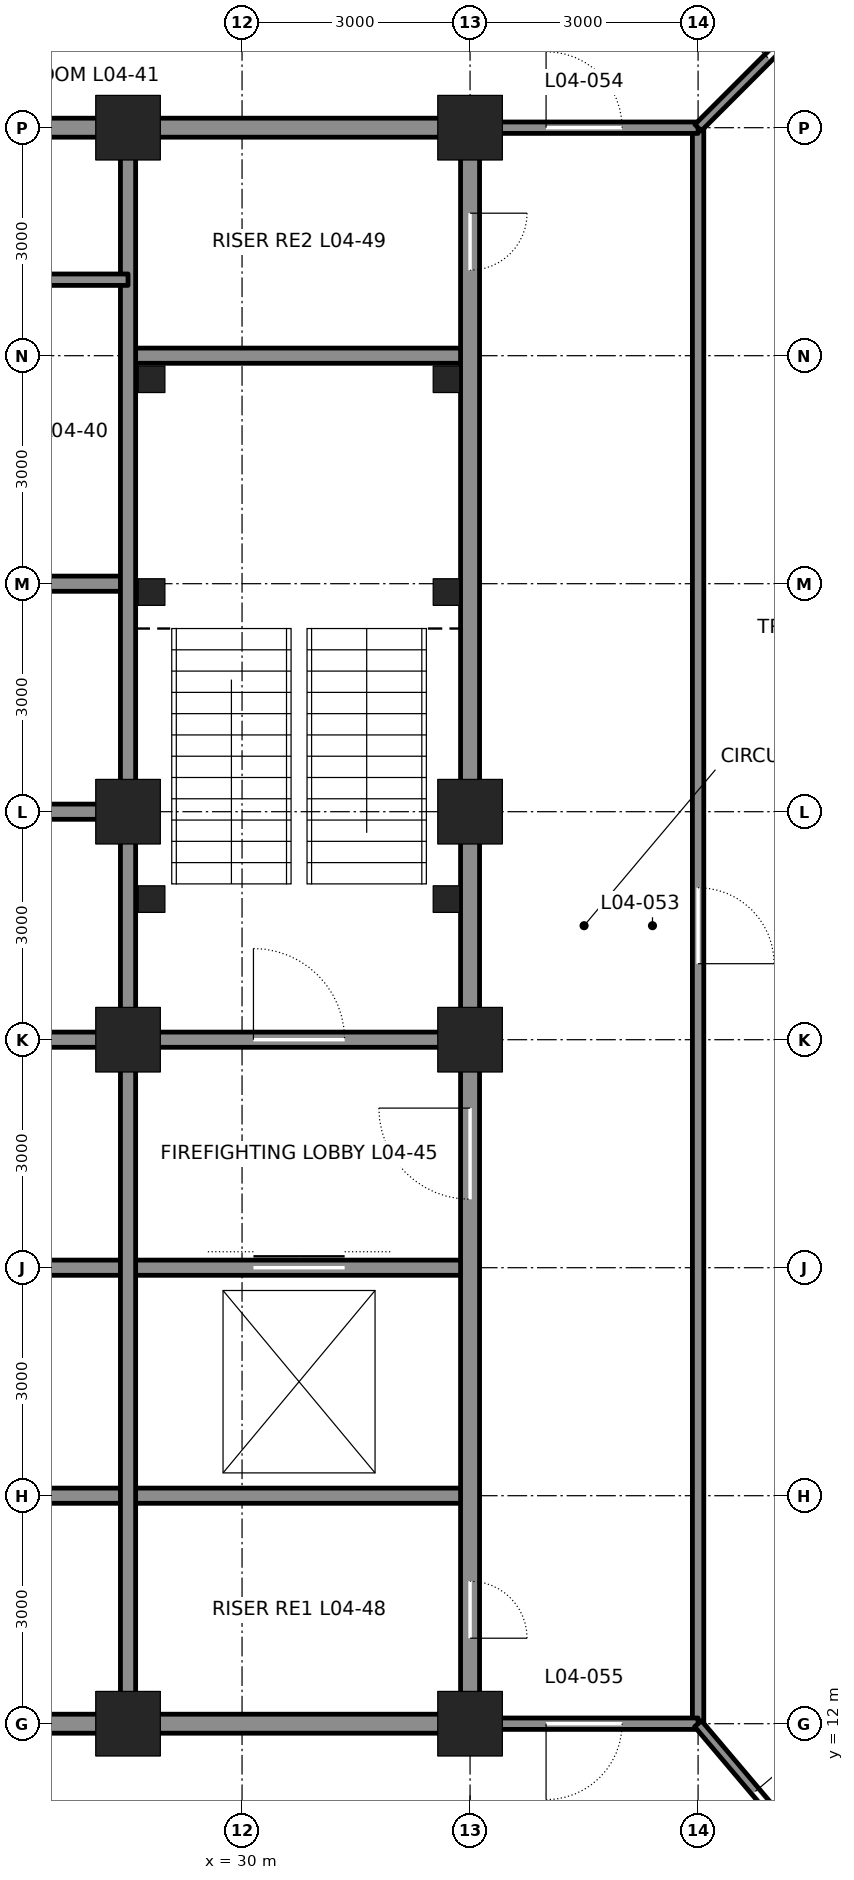
"""IFC4 building model, lengths in metres.
Left out: names, types, materials, properties, quantities, classifications, styles, units other than length and angle.
Written with IfcOpenShell. Run it as: python <this file> out.ifc"""

import sys

from ifc_helpers import new_model, si_unit, direction, frame, frame_2d, origin, origin_2d, place, context, subcontext, project, spatial, rectangle, hollow_rectangle, extrude, element, fill, save


model = new_model("IFC4")
c1 = context("Model", 3, precision=1e-05, world=origin(), true_north=direction((0.0, 1.0)))
c2 = subcontext(c1, "Body", "Model", "MODEL_VIEW")
j1 = project(units=[si_unit("LENGTHUNIT", "METRE"), si_unit("PLANEANGLEUNIT", "RADIAN")], contexts=[c1])
p1 = place(None, origin())
s1 = spatial("IfcSite", under=j1, at=p1, CompositionType="ELEMENT")
p2 = place(p1, origin())
s2 = spatial("IfcBuilding", under=s1, at=p2, CompositionType="ELEMENT")
p3 = place(p2, frame((0.0, 0.0, 24.3)))
s3 = spatial("IfcBuildingStorey", under=s2, at=p3, CompositionType="ELEMENT", Elevation=24.3)
for number, where, z_axis, x_axis in (
    (1, (28.5, 12.0, 0.0), (0.0, 0.0, 1.0), (1.0, 0.0, 0.0)),
    (2, (33.0, 12.0, 0.0), (0.0, 0.0, 1.0), (1.0, 0.0, 0.0)),
    (3, (28.5, 33.0, 0.0), (0.0, 0.0, 1.0), (1.0, 0.0, 0.0)),
    (4, (33.0, 33.0, 0.0), (0.0, 0.0, 1.0), (1.0, 0.0, 0.0)),
    (5, (33.0, 21.0, 0.0), (0.0, 0.0, 1.0), (1.0, 0.0, 0.0)),
    (6, (33.0, 24.0, 0.0), (0.0, 0.0, 1.0), (1.0, 0.0, 0.0)),
    (7, (28.5, 21.0, 0.0), (0.0, 0.0, 1.0), (1.0, 0.0, 0.0)),
    (8, (28.5, 24.0, 0.0), (0.0, 0.0, 1.0), (1.0, 0.0, 0.0)),
):
    element("IfcColumn", number, at=place(p3, frame(where, z_axis=z_axis, x_axis=x_axis)), inside=s3, PredefinedType="COLUMN", context=c2, shape_type="SweptSolid", body=[
        extrude(hollow_rectangle(XDim=0.85, YDim=0.85, WallThickness=0.085, at=origin_2d()), origin(), (0.0, 0.0, 1.0), 4.5),
    ])
p4 = place(p3, frame((25.75, 12.0, 0.0), z_axis=(0.0, 0.0, 1.0), x_axis=(1.0, 0.0, 0.0)))
e9 = element("IfcWall", 9, at=p4, inside=s3, PredefinedType="SOLIDWALL", context=c2, shape_type="SweptSolid", body=[
    extrude(rectangle(XDim=2.5, YDim=0.25, at=frame_2d((1.25, 0.0))), origin(), (0.0, 0.0, 1.0), 3.181),
])
p5 = place(p3, frame((28.75, 12.0, 0.0), z_axis=(0.0, 0.0, 1.0), x_axis=(1.0, 0.0, 0.0)))
e10 = element("IfcWall", 10, at=p5, inside=s3, PredefinedType="SOLIDWALL", context=c2, shape_type="SweptSolid", body=[
    extrude(rectangle(XDim=4.0, YDim=0.25, at=frame_2d((2.0, 0.0))), origin(), (0.0, 0.0, 1.0), 3.181),
])
p6 = place(p3, frame((25.5, 15.0, 0.0), z_axis=(0.0, 0.0, 1.0), x_axis=(1.0, 0.0, 0.0)))
e11 = element("IfcWall", 11, at=p6, inside=s3, PredefinedType="SOLIDWALL", context=c2, shape_type="SweptSolid", body=[
    extrude(rectangle(XDim=7.5, YDim=0.2, at=frame_2d((3.75, 0.0))), origin(), (0.0, 0.0, 1.0), 4.34),
])
p7 = place(p3, frame((25.5, 24.0, 0.0), z_axis=(0.0, 0.0, 1.0), x_axis=(1.0, 0.0, 0.0)))
e12 = element("IfcWall", 12, at=p7, inside=s3, PredefinedType="SOLIDWALL", context=c2, shape_type="SweptSolid", body=[
    extrude(rectangle(XDim=2.75, YDim=0.2, at=frame_2d((1.375, 0.0))), origin(), (0.0, 0.0, 1.0), 3.39),
])
p8 = place(p3, frame((25.5, 27.0, 0.0), z_axis=(0.0, 0.0, 1.0), x_axis=(1.0, 0.0, 0.0)))
e13 = element("IfcWall", 13, at=p8, inside=s3, PredefinedType="SOLIDWALL", context=c2, shape_type="SweptSolid", body=[
    extrude(rectangle(XDim=3.0, YDim=0.2, at=frame_2d((1.5, 0.0))), origin(), (0.0, 0.0, 1.0), 4.34),
])
p9 = place(p3, frame((28.5, 30.0, 0.0), z_axis=(0.0, 0.0, 1.0), x_axis=(1.0, 0.0, 0.0)))
e14 = element("IfcWall", 14, at=p9, inside=s3, PredefinedType="SOLIDWALL", context=c2, shape_type="SweptSolid", body=[
    extrude(rectangle(XDim=4.5, YDim=0.2, at=frame_2d((2.25, 0.0))), origin(), (0.0, 0.0, 1.0), 4.34),
])
p10 = place(p3, frame((25.75, 33.0, 0.0), z_axis=(0.0, 0.0, 1.0), x_axis=(1.0, 0.0, 0.0)))
e15 = element("IfcWall", 15, at=p10, inside=s3, PredefinedType="SOLIDWALL", context=c2, shape_type="SweptSolid", body=[
    extrude(rectangle(XDim=2.5, YDim=0.25, at=frame_2d((1.25, 0.0))), origin(), (0.0, 0.0, 1.0), 3.181),
])
p11 = place(p3, frame((28.75, 33.0, 0.0), z_axis=(0.0, 0.0, 1.0), x_axis=(1.0, 0.0, 0.0)))
e16 = element("IfcWall", 16, at=p11, inside=s3, PredefinedType="SOLIDWALL", context=c2, shape_type="SweptSolid", body=[
    extrude(rectangle(XDim=4.0, YDim=0.25, at=frame_2d((2.0, 0.0))), origin(), (0.0, 0.0, 1.0), 3.181),
])
p12 = place(p3, frame((25.5, 18.0, 0.0), z_axis=(0.0, 0.0, 1.0), x_axis=(1.0, 0.0, 0.0)))
e17 = element("IfcWall", 17, at=p12, inside=s3, PredefinedType="SOLIDWALL", context=c2, shape_type="SweptSolid", body=[
    extrude(rectangle(XDim=7.5, YDim=0.2, at=frame_2d((3.75, 0.0))), origin(), (0.0, 0.0, 1.0), 4.34),
])
p13 = place(p12, frame((4.65, 0.0, 0.0)))
e18 = element("IfcOpeningElement", 18, at=p13, cuts=e17, PredefinedType="OPENING", context=c2, shape_type="SweptSolid", body=[
    extrude(rectangle(XDim=1.2, YDim=2.1, at=frame_2d((0.6, 1.05))), frame((0.0, 0.11, 0.0), z_axis=(0.0, -1.0, 0.0), x_axis=(1.0, 0.0, 0.0)), (0.0, 0.0, 1.0), 0.22),
])
p14 = place(p3, frame((25.5, 21.0, 0.0), z_axis=(0.0, 0.0, 1.0), x_axis=(1.0, 0.0, 0.0)))
e19 = element("IfcWall", 19, at=p14, inside=s3, PredefinedType="SOLIDWALL", context=c2, shape_type="SweptSolid", body=[
    extrude(rectangle(XDim=2.75, YDim=0.2, at=frame_2d((1.375, 0.0))), origin(), (0.0, 0.0, 1.0), 3.39),
])
p15 = place(p3, frame((28.75, 21.0, 0.0), z_axis=(0.0, 0.0, 1.0), x_axis=(1.0, 0.0, 0.0)))
e20 = element("IfcWall", 20, at=p15, inside=s3, PredefinedType="SOLIDWALL", context=c2, shape_type="SweptSolid", body=[
    extrude(rectangle(XDim=4.0, YDim=0.2, at=frame_2d((2.0, 0.0))), origin(), (0.0, 0.0, 1.0), 3.39),
])
p16 = place(p15, frame((1.4, 0.0, 0.0)))
e21 = element("IfcOpeningElement", 21, at=p16, cuts=e20, PredefinedType="OPENING", context=c2, shape_type="SweptSolid", body=[
    extrude(rectangle(XDim=1.2, YDim=2.1, at=frame_2d((0.6, 1.05))), frame((0.0, 0.11, 0.0), z_axis=(0.0, -1.0, 0.0), x_axis=(1.0, 0.0, 0.0)), (0.0, 0.0, 1.0), 0.22),
])
p17 = place(p3, frame((28.5, 12.25, 0.0), z_axis=(0.0, 0.0, 1.0), x_axis=(0.0, 1.0, 0.0)))
e22 = element("IfcWall", 22, at=p17, inside=s3, PredefinedType="SOLIDWALL", context=c2, shape_type="SweptSolid", body=[
    extrude(rectangle(XDim=8.5, YDim=0.2, at=frame_2d((4.25, 0.0))), origin(), (0.0, 0.0, 1.0), 3.413),
])
p18 = place(p3, frame((28.5, 21.25, 0.0), z_axis=(0.0, 0.0, 1.0), x_axis=(0.0, 1.0, 0.0)))
e23 = element("IfcWall", 23, at=p18, inside=s3, PredefinedType="SOLIDWALL", context=c2, shape_type="SweptSolid", body=[
    extrude(rectangle(XDim=2.5, YDim=0.2, at=frame_2d((1.25, 0.0))), origin(), (0.0, 0.0, 1.0), 3.413),
])
p19 = place(p3, frame((28.5, 24.25, 0.0), z_axis=(0.0, 0.0, 1.0), x_axis=(0.0, 1.0, 0.0)))
e24 = element("IfcWall", 24, at=p19, inside=s3, PredefinedType="SOLIDWALL", context=c2, shape_type="SweptSolid", body=[
    extrude(rectangle(XDim=8.5, YDim=0.2, at=frame_2d((4.25, 0.0))), origin(), (0.0, 0.0, 1.0), 3.413),
])
p20 = place(p3, frame((33.0, 12.25, 0.0), z_axis=(0.0, 0.0, 1.0), x_axis=(0.0, 1.0, 0.0)))
e25 = element("IfcWall", 25, at=p20, inside=s3, PredefinedType="SOLIDWALL", context=c2, shape_type="SweptSolid", body=[
    extrude(rectangle(XDim=8.5, YDim=0.25, at=frame_2d((4.25, 0.0))), origin(), (0.0, 0.0, 1.0), 3.113),
])
p21 = place(p20, frame((6.65, 0.0, 0.0)))
e26 = element("IfcOpeningElement", 26, at=p21, cuts=e25, PredefinedType="OPENING", context=c2, shape_type="SweptSolid", body=[
    extrude(rectangle(XDim=1.2, YDim=2.1, at=frame_2d((0.6, 1.05))), frame((0.0, 0.135, 0.0), z_axis=(0.0, -1.0, 0.0), x_axis=(1.0, 0.0, 0.0)), (0.0, 0.0, 1.0), 0.27),
])
p22 = place(p20, frame((0.875, 0.0, 0.0)))
e27 = element("IfcOpeningElement", 27, at=p22, cuts=e25, PredefinedType="OPENING", context=c2, shape_type="SweptSolid", body=[
    extrude(rectangle(XDim=0.75, YDim=2.1, at=frame_2d((0.375, 1.05))), frame((0.0, 0.135, 0.0), z_axis=(0.0, -1.0, 0.0), x_axis=(1.0, 0.0, 0.0)), (0.0, 0.0, 1.0), 0.27),
])
p23 = place(p3, frame((33.0, 21.25, 0.0), z_axis=(0.0, 0.0, 1.0), x_axis=(0.0, 1.0, 0.0)))
e28 = element("IfcWall", 28, at=p23, inside=s3, PredefinedType="SOLIDWALL", context=c2, shape_type="SweptSolid", body=[
    extrude(rectangle(XDim=2.5, YDim=0.25, at=frame_2d((1.25, 0.0))), origin(), (0.0, 0.0, 1.0), 3.113),
])
p24 = place(p3, frame((33.0, 24.25, 0.0), z_axis=(0.0, 0.0, 1.0), x_axis=(0.0, 1.0, 0.0)))
e29 = element("IfcWall", 29, at=p24, inside=s3, PredefinedType="SOLIDWALL", context=c2, shape_type="SweptSolid", body=[
    extrude(rectangle(XDim=8.5, YDim=0.25, at=frame_2d((4.25, 0.0))), origin(), (0.0, 0.0, 1.0), 3.113),
])
p25 = place(p24, frame((6.875, 0.0, 0.0)))
e30 = element("IfcOpeningElement", 30, at=p25, cuts=e29, PredefinedType="OPENING", context=c2, shape_type="SweptSolid", body=[
    extrude(rectangle(XDim=0.75, YDim=2.1, at=frame_2d((0.375, 1.05))), frame((0.0, 0.135, 0.0), z_axis=(0.0, -1.0, 0.0), x_axis=(1.0, 0.0, 0.0)), (0.0, 0.0, 1.0), 0.27),
])
p26 = place(p3, frame((25.5, 31.0, 0.0), z_axis=(0.0, 0.0, 1.0), x_axis=(1.0, 0.0, 0.0)))
e31 = element("IfcWall", 31, at=p26, inside=s3, PredefinedType="PARTITIONING", context=c2, shape_type="SweptSolid", body=[
    extrude(rectangle(XDim=3.0, YDim=0.15, at=frame_2d((1.5, 0.0))), origin(), (0.0, 0.0, 1.0), 4.34),
])
p27 = place(p3, frame((36.0, 12.0, -0.3), z_axis=(0.0, 0.0, 1.0), x_axis=(0.0, 1.0, 0.0)))
e32 = element("IfcWall", 32, at=p27, inside=s3, PredefinedType="PARTITIONING", context=c2, shape_type="SweptSolid", body=[
    extrude(rectangle(XDim=21.0, YDim=0.15, at=frame_2d((10.5, 0.0))), origin(), (0.0, 0.0, 1.0), 4.34),
])
p28 = place(p27, frame((10.0, 0.0, 0.3)))
e33 = element("IfcOpeningElement", 33, at=p28, cuts=e32, PredefinedType="OPENING", context=c2, shape_type="SweptSolid", body=[
    extrude(rectangle(XDim=1.0, YDim=2.4, at=frame_2d((0.5, 1.2))), frame((0.0, 0.085, 0.0), z_axis=(0.0, -1.0, 0.0), x_axis=(1.0, 0.0, 0.0)), (0.0, 0.0, 1.0), 0.17),
])
p29 = place(p3, frame((33.0, 33.0, -0.3), z_axis=(0.0, 0.0, 1.0), x_axis=(1.0, 0.0, 0.0)))
e34 = element("IfcWall", 34, at=p29, inside=s3, PredefinedType="PARTITIONING", context=c2, shape_type="SweptSolid", body=[
    extrude(rectangle(XDim=3.0, YDim=0.15, at=frame_2d((1.5, 0.0))), origin(), (0.0, 0.0, 1.0), 3.481),
])
p30 = place(p29, frame((1.0, 0.0, 0.3)))
e35 = element("IfcOpeningElement", 35, at=p30, cuts=e34, PredefinedType="OPENING", context=c2, shape_type="SweptSolid", body=[
    extrude(rectangle(XDim=1.0, YDim=2.4, at=frame_2d((0.5, 1.2))), frame((0.0, 0.085, 0.0), z_axis=(0.0, -1.0, 0.0), x_axis=(1.0, 0.0, 0.0)), (0.0, 0.0, 1.0), 0.17),
])
p31 = place(p3, frame((33.0, 12.0, -0.3), z_axis=(0.0, 0.0, 1.0), x_axis=(1.0, 0.0, 0.0)))
e36 = element("IfcWall", 36, at=p31, inside=s3, PredefinedType="PARTITIONING", context=c2, shape_type="SweptSolid", body=[
    extrude(rectangle(XDim=3.0, YDim=0.15, at=frame_2d((1.5, 0.0))), origin(), (0.0, 0.0, 1.0), 3.481),
])
p32 = place(p31, frame((1.0, 0.0, 0.3)))
e37 = element("IfcOpeningElement", 37, at=p32, cuts=e36, PredefinedType="OPENING", context=c2, shape_type="SweptSolid", body=[
    extrude(rectangle(XDim=1.0, YDim=2.4, at=frame_2d((0.5, 1.2))), frame((0.0, 0.085, 0.0), z_axis=(0.0, -1.0, 0.0), x_axis=(1.0, 0.0, 0.0)), (0.0, 0.0, 1.0), 0.17),
])
p33 = place(p3, frame((36.0, 33.0, -0.3), z_axis=(0.0, 0.0, 1.0), x_axis=(0.707106781187, 0.707106781187, 0.0)))
e38 = element("IfcWall", 38, at=p33, inside=s3, PredefinedType="PARTITIONING", context=c2, shape_type="SweptSolid", body=[
    extrude(rectangle(XDim=11.842, YDim=0.12, at=frame_2d((5.921, 0.0))), origin(), (0.0, 0.0, 1.0), 4.34),
])
p34 = place(p33, frame((1.3, 0.0, 0.3)))
e39 = element("IfcOpeningElement", 39, at=p34, cuts=e38, PredefinedType="OPENING", context=c2, shape_type="SweptSolid", body=[
    extrude(rectangle(XDim=1.0, YDim=2.4, at=frame_2d((0.5, 1.2))), frame((0.0, 0.07, 0.0), z_axis=(0.0, -1.0, 0.0), x_axis=(1.0, 0.0, 0.0)), (0.0, 0.0, 1.0), 0.14),
])
p35 = place(p3, frame((36.0, 12.0, -0.3), z_axis=(0.0, 0.0, 1.0), x_axis=(0.645783707661, -0.763520401116, 0.0)))
e40 = element("IfcWall", 40, at=p35, inside=s3, PredefinedType="PARTITIONING", context=c2, shape_type="SweptSolid", body=[
    extrude(rectangle(XDim=8.906, YDim=0.12, at=frame_2d((4.453, 0.0))), origin(), (0.0, 0.0, 1.0), 4.34),
])
p36 = place(p35, frame((1.167, 0.0, 0.3)))
e41 = element("IfcOpeningElement", 41, at=p36, cuts=e40, PredefinedType="OPENING", context=c2, shape_type="SweptSolid", body=[
    extrude(rectangle(XDim=1.0, YDim=2.4, at=frame_2d((0.5, 1.2))), frame((0.0, 0.07, 0.0), z_axis=(0.0, -1.0, 0.0), x_axis=(1.0, 0.0, 0.0)), (0.0, 0.0, 1.0), 0.14),
])
for number, where, z_axis, x_axis in (
    (42, (28.81, 29.69, 0.0), (0.0, 0.0, 1.0), (1.0, 0.0, 0.0)),
    (43, (32.69, 29.69, 0.0), (0.0, 0.0, 1.0), (1.0, 0.0, 0.0)),
    (44, (28.81, 26.89, 0.0), (0.0, 0.0, 1.0), (1.0, 0.0, 0.0)),
    (45, (32.69, 26.89, 0.0), (0.0, 0.0, 1.0), (1.0, 0.0, 0.0)),
    (46, (28.81, 22.85, 0.0), (0.0, 0.0, 1.0), (1.0, 0.0, 0.0)),
    (47, (32.69, 22.85, 0.0), (0.0, 0.0, 1.0), (1.0, 0.0, 0.0)),
):
    element("IfcColumn", number, at=place(p3, frame(where, z_axis=z_axis, x_axis=x_axis)), inside=s3, PredefinedType="COLUMN", context=c2, shape_type="SweptSolid", body=[
        extrude(hollow_rectangle(XDim=0.35, YDim=0.35, WallThickness=0.035, at=origin_2d()), origin(), (0.0, 0.0, 1.0), 4.5),
    ])
p37 = place(p16, origin())
e48 = element("IfcDoor", 48, at=p37, inside=s3, OperationType="SINGLE_SWING_LEFT", PredefinedType="DOOR", context=c2, shape_type="SweptSolid", body=[
    extrude(rectangle(XDim=1.2, YDim=2.1, at=frame_2d((0.6, 1.05))), frame((0.0, 0.025, 0.0), z_axis=(0.0, -1.0, 0.0), x_axis=(1.0, 0.0, 0.0)), (0.0, 0.0, 1.0), 0.05),
])
fill(e21, e48)
p38 = place(p21, origin())
e49 = element("IfcDoor", 49, at=p38, inside=s3, OperationType="SINGLE_SWING_RIGHT", PredefinedType="DOOR", context=c2, shape_type="SweptSolid", body=[
    extrude(rectangle(XDim=1.2, YDim=2.1, at=frame_2d((0.6, 1.05))), frame((0.0, 0.025, 0.0), z_axis=(0.0, -1.0, 0.0), x_axis=(1.0, 0.0, 0.0)), (0.0, 0.0, 1.0), 0.05),
])
fill(e26, e49)
p39 = place(p13, origin())
e50 = element("IfcDoor", 50, at=p39, inside=s3, OperationType="DOUBLE_DOOR_SLIDING", PredefinedType="DOOR", context=c2, shape_type="SweptSolid", body=[
    extrude(rectangle(XDim=1.2, YDim=2.1, at=frame_2d((0.6, 1.05))), frame((0.0, 0.025, 0.0), z_axis=(0.0, -1.0, 0.0), x_axis=(1.0, 0.0, 0.0)), (0.0, 0.0, 1.0), 0.05),
])
fill(e18, e50)
p40 = place(p22, frame((0.75, 0.0, 0.0), z_axis=(0.0, 0.0, 1.0), x_axis=(-1.0, 0.0, 0.0)))
e51 = element("IfcDoor", 51, at=p40, inside=s3, OperationType="SINGLE_SWING_RIGHT", PredefinedType="DOOR", context=c2, shape_type="SweptSolid", body=[
    extrude(rectangle(XDim=0.75, YDim=2.1, at=frame_2d((0.375, 1.05))), frame((0.0, 0.025, 0.0), z_axis=(0.0, -1.0, 0.0), x_axis=(1.0, 0.0, 0.0)), (0.0, 0.0, 1.0), 0.05),
])
fill(e27, e51)
p41 = place(p25, frame((0.75, 0.0, 0.0), z_axis=(0.0, 0.0, 1.0), x_axis=(-1.0, 0.0, 0.0)))
e52 = element("IfcDoor", 52, at=p41, inside=s3, OperationType="SINGLE_SWING_LEFT", PredefinedType="DOOR", context=c2, shape_type="SweptSolid", body=[
    extrude(rectangle(XDim=0.75, YDim=2.1, at=frame_2d((0.375, 1.05))), frame((0.0, 0.025, 0.0), z_axis=(0.0, -1.0, 0.0), x_axis=(1.0, 0.0, 0.0)), (0.0, 0.0, 1.0), 0.05),
])
fill(e30, e52)
p42 = place(p28, frame((1.0, 0.0, 0.0), z_axis=(0.0, 0.0, 1.0), x_axis=(-1.0, 0.0, 0.0)))
e53 = element("IfcDoor", 53, at=p42, inside=s3, OperationType="SINGLE_SWING_RIGHT", PredefinedType="DOOR", context=c2, shape_type="SweptSolid", body=[
    extrude(rectangle(XDim=1.0, YDim=2.4, at=frame_2d((0.5, 1.2))), frame((0.0, 0.025, 0.0), z_axis=(0.0, -1.0, 0.0), x_axis=(1.0, 0.0, 0.0)), (0.0, 0.0, 1.0), 0.05),
])
fill(e33, e53)
p43 = place(p30, origin())
e54 = element("IfcDoor", 54, at=p43, inside=s3, OperationType="SINGLE_SWING_LEFT", PredefinedType="DOOR", context=c2, shape_type="SweptSolid", body=[
    extrude(rectangle(XDim=1.0, YDim=2.4, at=frame_2d((0.5, 1.2))), frame((0.0, 0.025, 0.0), z_axis=(0.0, -1.0, 0.0), x_axis=(1.0, 0.0, 0.0)), (0.0, 0.0, 1.0), 0.05),
])
fill(e35, e54)
p44 = place(p32, frame((1.0, 0.0, 0.0), z_axis=(0.0, 0.0, 1.0), x_axis=(-1.0, 0.0, 0.0)))
e55 = element("IfcDoor", 55, at=p44, inside=s3, OperationType="SINGLE_SWING_RIGHT", PredefinedType="DOOR", context=c2, shape_type="SweptSolid", body=[
    extrude(rectangle(XDim=1.0, YDim=2.4, at=frame_2d((0.5, 1.2))), frame((0.0, 0.025, 0.0), z_axis=(0.0, -1.0, 0.0), x_axis=(1.0, 0.0, 0.0)), (0.0, 0.0, 1.0), 0.05),
])
fill(e37, e55)
p45 = place(p34, origin())
e56 = element("IfcDoor", 56, at=p45, inside=s3, OperationType="SINGLE_SWING_LEFT", PredefinedType="DOOR", context=c2, shape_type="SweptSolid", body=[
    extrude(rectangle(XDim=1.0, YDim=2.4, at=frame_2d((0.5, 1.2))), frame((0.0, 0.025, 0.0), z_axis=(0.0, -1.0, 0.0), x_axis=(1.0, 0.0, 0.0)), (0.0, 0.0, 1.0), 0.05),
])
fill(e39, e56)
p46 = place(p36, origin())
e57 = element("IfcDoor", 57, at=p46, inside=s3, OperationType="SINGLE_SWING_LEFT", PredefinedType="DOOR", context=c2, shape_type="SweptSolid", body=[
    extrude(rectangle(XDim=1.0, YDim=2.4, at=frame_2d((0.5, 1.2))), frame((0.0, 0.025, 0.0), z_axis=(0.0, -1.0, 0.0), x_axis=(1.0, 0.0, 0.0)), (0.0, 0.0, 1.0), 0.05),
])
fill(e41, e57)
save(model, sys.argv[1])
